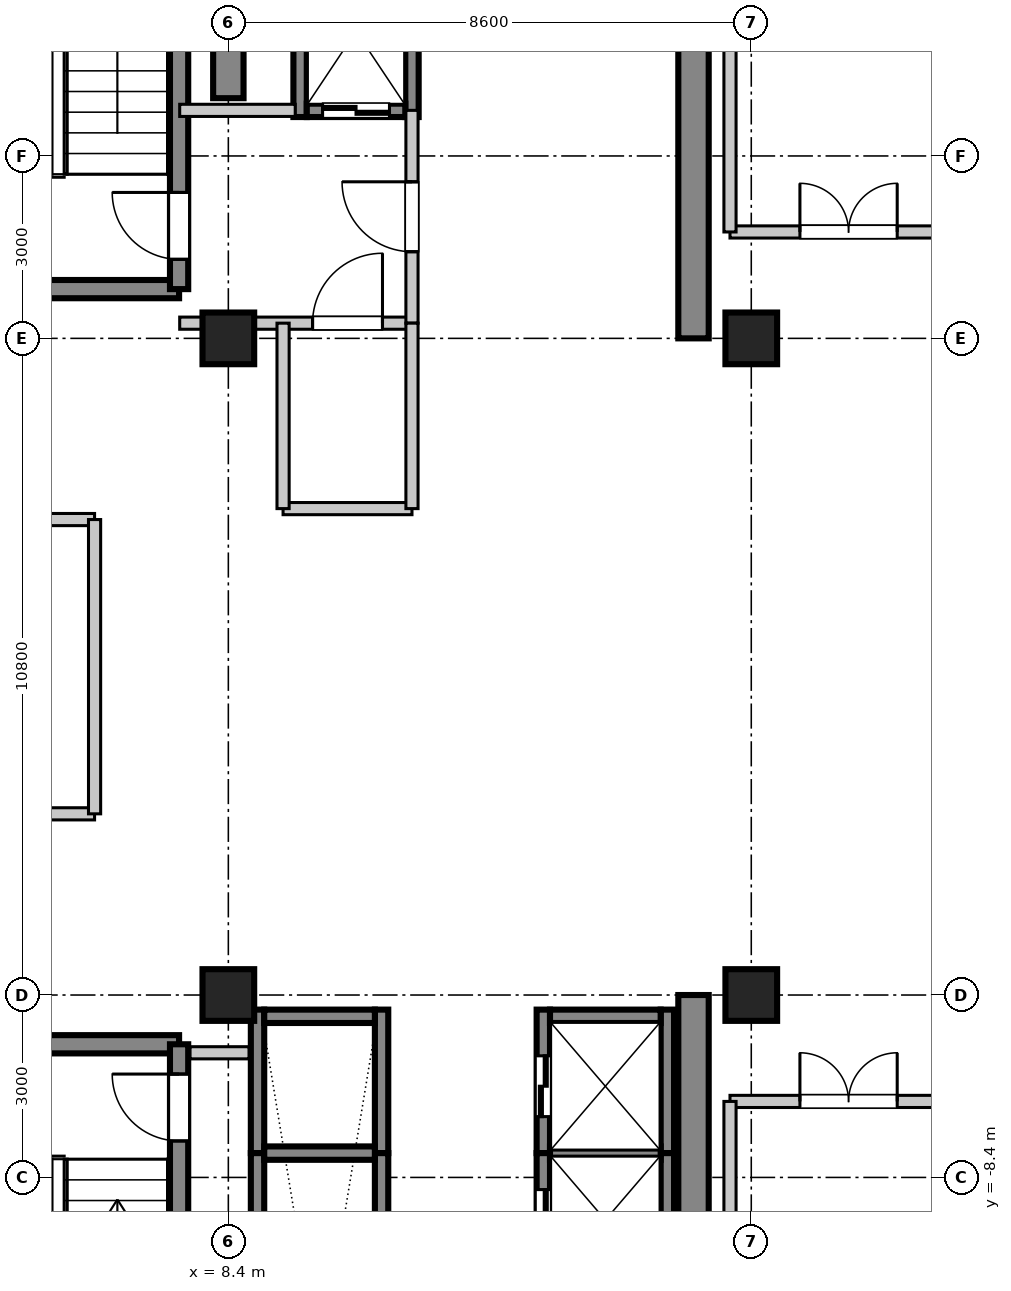
"""IFC4 building model, lengths in metres.
Left out: names, types, materials, properties, quantities, classifications, styles, units other than length and angle.
Written with IfcOpenShell. Run it as: python <this file> out.ifc"""

import sys

from ifc_helpers import new_model, si_unit, direction, frame, frame_2d, origin, origin_2d, place, context, subcontext, project, spatial, rectangle, extrude, source, transform, mapped, element, fill, save


model = new_model("IFC4")
c1 = context("Model", 3, precision=1e-05, world=origin(), true_north=direction((0.0, 1.0)))
c2 = subcontext(c1, "Body", "Model", "MODEL_VIEW")
j1 = project(units=[si_unit("LENGTHUNIT", "METRE"), si_unit("PLANEANGLEUNIT", "RADIAN")], contexts=[c1])
p1 = place(None, origin())
s1 = spatial("IfcSite", under=j1, at=p1, CompositionType="ELEMENT")
p2 = place(p1, origin())
s2 = spatial("IfcBuilding", under=s1, at=p2, CompositionType="ELEMENT")
p3 = place(p2, frame((0.0, 0.0, 200.1)))
s3 = spatial("IfcBuildingStorey", under=s2, at=p3, CompositionType="ELEMENT", Elevation=200.1)
m1 = source(origin(), c2, "Body", "SweptSolid", [
    extrude(rectangle(XDim=0.85, YDim=0.85, at=origin_2d()), origin(), (0.0, 0.0, 1.0), 4.755),
])
for number, where, z_axis, x_axis in (
    (1, (8.4, -5.4, 0.0), (0.0, 0.0, 1.0), (1.0, 0.0, 0.0)),
    (2, (8.4, 5.4, 0.0), (0.0, 0.0, 1.0), (1.0, 0.0, 0.0)),
    (3, (17.0, -5.4, 0.0), (0.0, 0.0, 1.0), (1.0, 0.0, 0.0)),
    (4, (17.0, 5.4, 0.0), (0.0, 0.0, 1.0), (1.0, 0.0, 0.0)),
):
    element("IfcColumn", number, at=place(p3, frame(where, z_axis=z_axis, x_axis=x_axis)), inside=s3, PredefinedType="PILASTER", context=c2, shape_type="MappedRepresentation", body=[
        mapped(m1, transform((0.0, 0.0, 0.0), scale=1.0)),
    ])
m2 = source(origin(), c2, "Body", "SweptSolid", [
    extrude(rectangle(XDim=7.65, YDim=0.5, at=frame_2d((3.825, 0.0))), origin(), (0.0, 0.0, 1.0), 4.51),
])
p4 = place(p3, frame((8.4, 9.35, 0.0), z_axis=(0.0, 0.0, 1.0), x_axis=(0.0, 1.0, 0.0)))
e5 = element("IfcWall", 5, at=p4, inside=s3, PredefinedType="SHEAR", context=c2, shape_type="MappedRepresentation", body=[
    mapped(m2, transform((0.0, 0.0, 0.0), scale=1.0)),
])
m3 = source(origin(), c2, "Body", "SweptSolid", [
    extrude(rectangle(XDim=11.6, YDim=0.5, at=frame_2d((5.8, 0.0))), origin(), (0.0, 0.0, 1.0), 4.51),
])
for number, where, z_axis, x_axis in (
    (6, (16.05, 5.4, 0.0), (0.0, 0.0, 1.0), (0.0, 1.0, 0.0)),
    (7, (16.05, -17.0, 0.0), (0.0, 0.0, 1.0), (0.0, 1.0, 0.0)),
):
    element("IfcWall", number, at=place(p3, frame(where, z_axis=z_axis, x_axis=x_axis)), inside=s3, PredefinedType="SHEAR", context=c2, shape_type="MappedRepresentation", body=[
        mapped(m3, transform((0.0, 0.0, 0.0), scale=1.0)),
    ])
m4 = source(origin(), c2, "Body", "SweptSolid", [
    extrude(rectangle(XDim=3.98, YDim=0.3, at=frame_2d((1.99, 0.0))), origin(), (0.0, 0.0, 1.0), 4.51),
])
p5 = place(p3, frame((3.61, 6.21, 0.0), z_axis=(0.0, 0.0, 1.0), x_axis=(1.0, 0.0, 0.0)))
e8 = element("IfcWall", 8, at=p5, inside=s3, PredefinedType="SHEAR", context=c2, shape_type="MappedRepresentation", body=[
    mapped(m4, transform((0.0, 0.0, 0.0), scale=1.0)),
])
m5 = source(origin(), c2, "Body", "SweptSolid", [
    extrude(rectangle(XDim=9.38, YDim=0.3, at=frame_2d((4.69, 0.0))), origin(), (0.0, 0.0, 1.0), 4.51),
])
p6 = place(p3, frame((7.59, 6.21, 0.0), z_axis=(0.0, 0.0, 1.0), x_axis=(0.0, 1.0, 0.0)))
e9 = element("IfcWall", 9, at=p6, inside=s3, PredefinedType="SHEAR", context=c2, shape_type="MappedRepresentation", body=[
    mapped(m5, transform((0.0, 0.0, 0.0), scale=1.0)),
])
p7 = place(p6, frame((0.49, 0.0, 0.0)))
e10 = element("IfcOpeningElement", 10, at=p7, cuts=e9, PredefinedType="OPENING", context=c2, shape_type="SweptSolid", body=[
    extrude(rectangle(XDim=1.1, YDim=2.15, at=frame_2d((0.55, 1.075))), frame((0.0, 0.16, 0.0), z_axis=(0.0, -1.0, 0.0), x_axis=(1.0, 0.0, 0.0)), (0.0, 0.0, 1.0), 0.32),
])
p8 = place(p3, frame((3.61, -6.21, 0.0), z_axis=(0.0, 0.0, 1.0), x_axis=(1.0, 0.0, 0.0)))
e11 = element("IfcWall", 11, at=p8, inside=s3, PredefinedType="SHEAR", context=c2, shape_type="MappedRepresentation", body=[
    mapped(m4, transform((0.0, 0.0, 0.0), scale=1.0)),
])
p9 = place(p3, frame((7.59, -15.59, 0.0), z_axis=(0.0, 0.0, 1.0), x_axis=(0.0, 1.0, 0.0)))
e12 = element("IfcWall", 12, at=p9, inside=s3, PredefinedType="SHEAR", context=c2, shape_type="MappedRepresentation", body=[
    mapped(m5, transform((0.0, 0.0, 0.0), scale=1.0)),
])
p10 = place(p9, frame((7.79, 0.0, 0.0)))
e13 = element("IfcOpeningElement", 13, at=p10, cuts=e12, PredefinedType="OPENING", context=c2, shape_type="SweptSolid", body=[
    extrude(rectangle(XDim=1.1, YDim=2.15, at=frame_2d((0.55, 1.075))), frame((0.0, 0.16, 0.0), z_axis=(0.0, -1.0, 0.0), x_axis=(1.0, 0.0, 0.0)), (0.0, 0.0, 1.0), 0.32),
])
m6 = source(origin(), c2, "Body", "SweptSolid", [
    extrude(rectangle(XDim=2.36, YDim=0.22, at=frame_2d((1.18, 0.0))), origin(), (0.0, 0.0, 1.0), 4.51),
])
p11 = place(p3, frame((13.58, -8.0, 0.0), z_axis=(0.0, 0.0, 1.0), x_axis=(0.0, 1.0, 0.0)))
e14 = element("IfcWall", 14, at=p11, inside=s3, PredefinedType="SHEAR", context=c2, shape_type="MappedRepresentation", body=[
    mapped(m6, transform((0.0, 0.0, 0.0), scale=1.0)),
])
p12 = place(p11, frame((0.6, 0.0, 0.0)))
e15 = element("IfcOpeningElement", 15, at=p12, cuts=e14, PredefinedType="OPENING", context=c2, shape_type="SweptSolid", body=[
    extrude(rectangle(XDim=1.0, YDim=2.2, at=frame_2d((0.5, 1.1))), frame((0.0, 0.12, 0.0), z_axis=(0.0, -1.0, 0.0), x_axis=(1.0, 0.0, 0.0)), (0.0, 0.0, 1.0), 0.24),
])
p13 = place(p3, frame((15.62, -8.0, 0.0), z_axis=(0.0, 0.0, 1.0), x_axis=(0.0, 1.0, 0.0)))
e16 = element("IfcWall", 16, at=p13, inside=s3, PredefinedType="SHEAR", context=c2, shape_type="MappedRepresentation", body=[
    mapped(m6, transform((0.0, 0.0, 0.0), scale=1.0)),
])
m7 = source(origin(), c2, "Body", "SweptSolid", [
    extrude(rectangle(XDim=1.82, YDim=0.22, at=frame_2d((0.91, 0.0))), origin(), (0.0, 0.0, 1.0), 4.51),
])
p14 = place(p3, frame((13.69, -5.75, 0.0), z_axis=(0.0, 0.0, 1.0), x_axis=(1.0, 0.0, 0.0)))
e17 = element("IfcWall", 17, at=p14, inside=s3, PredefinedType="SHEAR", context=c2, shape_type="MappedRepresentation", body=[
    mapped(m7, transform((0.0, 0.0, 0.0), scale=1.0)),
])
m8 = source(origin(), c2, "Body", "SweptSolid", [
    extrude(rectangle(XDim=2.2, YDim=0.22, at=frame_2d((1.1, 0.0))), origin(), (0.0, 0.0, 1.0), 4.51),
])
p15 = place(p3, frame((13.58, -10.2, 0.0), z_axis=(0.0, 0.0, 1.0), x_axis=(0.0, 1.0, 0.0)))
e18 = element("IfcWall", 18, at=p15, inside=s3, PredefinedType="SHEAR", context=c2, shape_type="MappedRepresentation", body=[
    mapped(m8, transform((0.0, 0.0, 0.0), scale=1.0)),
])
p16 = place(p15, frame((0.6, 0.0, 0.0)))
e19 = element("IfcOpeningElement", 19, at=p16, cuts=e18, PredefinedType="OPENING", context=c2, shape_type="SweptSolid", body=[
    extrude(rectangle(XDim=1.0, YDim=2.2, at=frame_2d((0.5, 1.1))), frame((0.0, 0.12, 0.0), z_axis=(0.0, -1.0, 0.0), x_axis=(1.0, 0.0, 0.0)), (0.0, 0.0, 1.0), 0.24),
])
p17 = place(p3, frame((15.62, -10.2, 0.0), z_axis=(0.0, 0.0, 1.0), x_axis=(0.0, 1.0, 0.0)))
e20 = element("IfcWall", 20, at=p17, inside=s3, PredefinedType="SHEAR", context=c2, shape_type="MappedRepresentation", body=[
    mapped(m8, transform((0.0, 0.0, 0.0), scale=1.0)),
])
m9 = source(origin(), c2, "Body", "SweptSolid", [
    extrude(rectangle(XDim=1.82, YDim=0.22, at=frame_2d((0.91, 0.0))), origin(), (0.0, 0.0, 1.0), 4.8),
])
p18 = place(p3, frame((13.69, -8.0, 0.0), z_axis=(0.0, 0.0, 1.0), x_axis=(1.0, 0.0, 0.0)))
e21 = element("IfcWall", 21, at=p18, inside=s3, PredefinedType="SHEAR", context=c2, shape_type="MappedRepresentation", body=[
    mapped(m9, transform((0.0, 0.0, 0.0), scale=1.0)),
])
for number, where, z_axis, x_axis in (
    (22, (8.88, -8.0, 0.0), (0.0, 0.0, 1.0), (0.0, 1.0, 0.0)),
    (23, (10.92, -8.0, 0.0), (0.0, 0.0, 1.0), (0.0, 1.0, 0.0)),
):
    element("IfcWall", number, at=place(p3, frame(where, z_axis=z_axis, x_axis=x_axis)), inside=s3, PredefinedType="SHEAR", context=c2, shape_type="MappedRepresentation", body=[
        mapped(m6, transform((0.0, 0.0, 0.0), scale=1.0)),
    ])
p19 = place(p3, frame((8.99, -5.75, 0.0), z_axis=(0.0, 0.0, 1.0), x_axis=(1.0, 0.0, 0.0)))
e24 = element("IfcWall", 24, at=p19, inside=s3, PredefinedType="SHEAR", context=c2, shape_type="MappedRepresentation", body=[
    mapped(m7, transform((0.0, 0.0, 0.0), scale=1.0)),
])
for number, where, z_axis, x_axis in (
    (25, (8.88, -10.2, 0.0), (0.0, 0.0, 1.0), (0.0, 1.0, 0.0)),
    (26, (10.92, -10.2, 0.0), (0.0, 0.0, 1.0), (0.0, 1.0, 0.0)),
):
    element("IfcWall", number, at=place(p3, frame(where, z_axis=z_axis, x_axis=x_axis)), inside=s3, PredefinedType="SHEAR", context=c2, shape_type="MappedRepresentation", body=[
        mapped(m8, transform((0.0, 0.0, 0.0), scale=1.0)),
    ])
p20 = place(p3, frame((8.99, -8.0, 0.0), z_axis=(0.0, 0.0, 1.0), x_axis=(1.0, 0.0, 0.0)))
e27 = element("IfcWall", 27, at=p20, inside=s3, PredefinedType="SHEAR", context=c2, shape_type="MappedRepresentation", body=[
    mapped(m9, transform((0.0, 0.0, 0.0), scale=1.0)),
])
m10 = source(origin(), c2, "Body", "SweptSolid", [
    extrude(rectangle(XDim=2.82, YDim=0.22, at=frame_2d((1.41, 0.0))), origin(), (0.0, 0.0, 1.0), 4.51),
])
for number, where, z_axis, x_axis in (
    (28, (9.58, 9.04, 0.0), (0.0, 0.0, 1.0), (0.0, 1.0, 0.0)),
    (29, (11.42, 9.04, 0.0), (0.0, 0.0, 1.0), (0.0, 1.0, 0.0)),
):
    element("IfcWall", number, at=place(p3, frame(where, z_axis=z_axis, x_axis=x_axis)), inside=s3, PredefinedType="SHEAR", context=c2, shape_type="MappedRepresentation", body=[
        mapped(m10, transform((0.0, 0.0, 0.0), scale=1.0)),
    ])
m11 = source(origin(), c2, "Body", "SweptSolid", [
    extrude(rectangle(XDim=1.62, YDim=0.22, at=frame_2d((0.81, 0.0))), origin(), (0.0, 0.0, 1.0), 4.51),
])
p21 = place(p3, frame((9.69, 9.15, 0.0), z_axis=(0.0, 0.0, 1.0), x_axis=(1.0, 0.0, 0.0)))
e30 = element("IfcWall", 30, at=p21, inside=s3, PredefinedType="SHEAR", context=c2, shape_type="MappedRepresentation", body=[
    mapped(m11, transform((0.0, 0.0, 0.0), scale=1.0)),
])
p22 = place(p21, frame((0.26, 0.0, 0.0)))
e31 = element("IfcOpeningElement", 31, at=p22, cuts=e30, PredefinedType="OPENING", context=c2, shape_type="SweptSolid", body=[
    extrude(rectangle(XDim=1.1, YDim=2.2, at=frame_2d((0.55, 1.1))), frame((0.0, 0.12, 0.0), z_axis=(0.0, -1.0, 0.0), x_axis=(1.0, 0.0, 0.0)), (0.0, 0.0, 1.0), 0.24),
])
m12 = source(origin(), c2, "Body", "SweptSolid", [
    extrude(rectangle(XDim=3.82, YDim=0.2, at=frame_2d((1.91, 0.0))), origin(), (0.0, 0.0, 1.0), 3.4),
])
p23 = place(p3, frame((7.6, 5.65, 0.0), z_axis=(0.0, 0.0, 1.0), x_axis=(1.0, 0.0, 0.0)))
e32 = element("IfcWall", 32, at=p23, inside=s3, PredefinedType="PARTITIONING", context=c2, shape_type="MappedRepresentation", body=[
    mapped(m12, transform((0.0, 0.0, 0.0), scale=1.0)),
])
p24 = place(p23, frame((2.185, 0.0, 0.0)))
e33 = element("IfcOpeningElement", 33, at=p24, cuts=e32, PredefinedType="OPENING", context=c2, shape_type="SweptSolid", body=[
    extrude(rectangle(XDim=1.15, YDim=2.15, at=frame_2d((0.575, 1.075))), frame((0.0, 0.11, 0.0), z_axis=(0.0, -1.0, 0.0), x_axis=(1.0, 0.0, 0.0)), (0.0, 0.0, 1.0), 0.22),
])
m13 = source(origin(), c2, "Body", "SweptSolid", [
    extrude(rectangle(XDim=1.9, YDim=0.2, at=frame_2d((0.95, 0.0))), origin(), (0.0, 0.0, 1.0), 3.4),
])
p25 = place(p3, frame((7.6, 9.15, 0.0), z_axis=(0.0, 0.0, 1.0), x_axis=(1.0, 0.0, 0.0)))
e34 = element("IfcWall", 34, at=p25, inside=s3, PredefinedType="PARTITIONING", context=c2, shape_type="MappedRepresentation", body=[
    mapped(m13, transform((0.0, 0.0, 0.0), scale=1.0)),
])
m14 = source(origin(), c2, "Body", "SweptSolid", [
    extrude(rectangle(XDim=3.5, YDim=0.2, at=frame_2d((1.75, 0.0))), origin(), (0.0, 0.0, 1.0), 3.4),
])
p26 = place(p3, frame((11.42, 5.65, 0.0), z_axis=(0.0, 0.0, 1.0), x_axis=(0.0, 1.0, 0.0)))
e35 = element("IfcWall", 35, at=p26, inside=s3, PredefinedType="PARTITIONING", context=c2, shape_type="MappedRepresentation", body=[
    mapped(m14, transform((0.0, 0.0, 0.0), scale=1.0)),
])
p27 = place(p26, frame((1.175, 0.0, 0.0)))
e36 = element("IfcOpeningElement", 36, at=p27, cuts=e35, PredefinedType="OPENING", context=c2, shape_type="SweptSolid", body=[
    extrude(rectangle(XDim=1.15, YDim=2.15, at=frame_2d((0.575, 1.075))), frame((0.0, 0.11, 0.0), z_axis=(0.0, -1.0, 0.0), x_axis=(1.0, 0.0, 0.0)), (0.0, 0.0, 1.0), 0.22),
])
m15 = source(origin(), c2, "Body", "SweptSolid", [
    extrude(rectangle(XDim=0.97, YDim=0.2, at=frame_2d((0.485, 0.0))), origin(), (0.0, 0.0, 1.0), 3.4),
])
p28 = place(p3, frame((7.77, -6.35, 0.0), z_axis=(0.0, 0.0, 1.0), x_axis=(1.0, 0.0, 0.0)))
e37 = element("IfcWall", 37, at=p28, inside=s3, PredefinedType="PARTITIONING", context=c2, shape_type="MappedRepresentation", body=[
    mapped(m15, transform((0.0, 0.0, 0.0), scale=1.0)),
])
m16 = source(origin(), c2, "Body", "SweptSolid", [
    extrude(rectangle(XDim=2.12, YDim=0.2, at=frame_2d((1.06, 0.0))), origin(), (0.0, 0.0, 1.0), 3.4),
])
p29 = place(p3, frame((9.3, 2.6, 0.0), z_axis=(0.0, 0.0, 1.0), x_axis=(1.0, 0.0, 0.0)))
e38 = element("IfcWall", 38, at=p29, inside=s3, PredefinedType="PARTITIONING", context=c2, shape_type="MappedRepresentation", body=[
    mapped(m16, transform((0.0, 0.0, 0.0), scale=1.0)),
])
m17 = source(origin(), c2, "Body", "SweptSolid", [
    extrude(rectangle(XDim=3.05, YDim=0.2, at=frame_2d((1.525, 0.0))), origin(), (0.0, 0.0, 1.0), 3.4),
])
for number, where, z_axis, x_axis in (
    (39, (9.3, 2.6, 0.0), (0.0, 0.0, 1.0), (0.0, 1.0, 0.0)),
    (40, (11.42, 2.6, 0.0), (0.0, 0.0, 1.0), (0.0, 1.0, 0.0)),
):
    element("IfcWall", number, at=place(p3, frame(where, z_axis=z_axis, x_axis=x_axis)), inside=s3, PredefinedType="PARTITIONING", context=c2, shape_type="MappedRepresentation", body=[
        mapped(m17, transform((0.0, 0.0, 0.0), scale=1.0)),
    ])
m18 = source(origin(), c2, "Body", "SweptSolid", [
    extrude(rectangle(XDim=15.3, YDim=0.2, at=frame_2d((7.65, 0.0))), origin(), (0.0, 0.0, 1.0), 3.4),
])
p30 = place(p3, frame((-9.1, -2.42, 0.0), z_axis=(0.0, 0.0, 1.0), x_axis=(1.0, 0.0, 0.0)))
e41 = element("IfcWall", 41, at=p30, inside=s3, PredefinedType="PARTITIONING", context=c2, shape_type="MappedRepresentation", body=[
    mapped(m18, transform((0.0, 0.0, 0.0), scale=1.0)),
])
p31 = place(p30, frame((8.525, 0.0, 0.0)))
e42 = element("IfcOpeningElement", 42, at=p31, cuts=e41, PredefinedType="OPENING", context=c2, shape_type="SweptSolid", body=[
    extrude(rectangle(XDim=1.15, YDim=2.15, at=frame_2d((0.575, 1.075))), frame((0.0, 0.11, 0.0), z_axis=(0.0, -1.0, 0.0), x_axis=(1.0, 0.0, 0.0)), (0.0, 0.0, 1.0), 0.22),
])
p32 = place(p3, frame((-9.1, 2.42, 0.0), z_axis=(0.0, 0.0, 1.0), x_axis=(1.0, 0.0, 0.0)))
e43 = element("IfcWall", 43, at=p32, inside=s3, PredefinedType="PARTITIONING", context=c2, shape_type="MappedRepresentation", body=[
    mapped(m18, transform((0.0, 0.0, 0.0), scale=1.0)),
])
m19 = source(origin(), c2, "Body", "SweptSolid", [
    extrude(rectangle(XDim=4.84, YDim=0.2, at=frame_2d((2.42, 0.0))), origin(), (0.0, 0.0, 1.0), 3.4),
])
p33 = place(p3, frame((6.2, -2.42, 0.0), z_axis=(0.0, 0.0, 1.0), x_axis=(0.0, 1.0, 0.0)))
e44 = element("IfcWall", 44, at=p33, inside=s3, PredefinedType="PARTITIONING", context=c2, shape_type="MappedRepresentation", body=[
    mapped(m19, transform((0.0, 0.0, 0.0), scale=1.0)),
])
m20 = source(origin(), c2, "Body", "SweptSolid", [
    extrude(rectangle(XDim=5.57, YDim=0.2, at=frame_2d((2.785, 0.0))), origin(), (0.0, 0.0, 1.0), 3.4),
])
p34 = place(p3, frame((16.65, 7.15, 0.0), z_axis=(0.0, 0.0, 1.0), x_axis=(1.0, 0.0, 0.0)))
e45 = element("IfcWall", 45, at=p34, inside=s3, PredefinedType="PARTITIONING", context=c2, shape_type="MappedRepresentation", body=[
    mapped(m20, transform((0.0, 0.0, 0.0), scale=1.0)),
])
p35 = place(p34, frame((1.15, 0.0, 0.0)))
e46 = element("IfcOpeningElement", 46, at=p35, cuts=e45, PredefinedType="OPENING", context=c2, shape_type="SweptSolid", body=[
    extrude(rectangle(XDim=1.6, YDim=2.15, at=frame_2d((0.8, 1.075))), frame((0.0, 0.11, 0.0), z_axis=(0.0, -1.0, 0.0), x_axis=(1.0, 0.0, 0.0)), (0.0, 0.0, 1.0), 0.22),
])
m21 = source(origin(), c2, "Body", "SweptSolid", [
    extrude(rectangle(XDim=8.9, YDim=0.2, at=frame_2d((4.45, 0.0))), origin(), (0.0, 0.0, 1.0), 3.4),
])
p36 = place(p3, frame((16.65, 7.15, 0.0), z_axis=(0.0, 0.0, 1.0), x_axis=(0.0, 1.0, 0.0)))
e47 = element("IfcWall", 47, at=p36, inside=s3, PredefinedType="PARTITIONING", context=c2, shape_type="MappedRepresentation", body=[
    mapped(m21, transform((0.0, 0.0, 0.0), scale=1.0)),
])
p37 = place(p3, frame((16.65, -7.15, 0.0), z_axis=(0.0, 0.0, 1.0), x_axis=(1.0, 0.0, 0.0)))
e48 = element("IfcWall", 48, at=p37, inside=s3, PredefinedType="PARTITIONING", context=c2, shape_type="MappedRepresentation", body=[
    mapped(m20, transform((0.0, 0.0, 0.0), scale=1.0)),
])
p38 = place(p37, frame((1.15, 0.0, 0.0)))
e49 = element("IfcOpeningElement", 49, at=p38, cuts=e48, PredefinedType="OPENING", context=c2, shape_type="SweptSolid", body=[
    extrude(rectangle(XDim=1.6, YDim=2.15, at=frame_2d((0.8, 1.075))), frame((0.0, 0.11, 0.0), z_axis=(0.0, -1.0, 0.0), x_axis=(1.0, 0.0, 0.0)), (0.0, 0.0, 1.0), 0.22),
])
p39 = place(p3, frame((16.65, -16.05, 0.0), z_axis=(0.0, 0.0, 1.0), x_axis=(0.0, 1.0, 0.0)))
e50 = element("IfcWall", 50, at=p39, inside=s3, PredefinedType="PARTITIONING", context=c2, shape_type="MappedRepresentation", body=[
    mapped(m21, transform((0.0, 0.0, 0.0), scale=1.0)),
])
m22 = source(origin(), c2, "Body", "SweptSolid", [
    extrude(rectangle(XDim=1.1, YDim=2.15, at=frame_2d((0.55, 1.075))), frame((0.0, 0.025, 0.0), z_axis=(0.0, -1.0, 0.0), x_axis=(1.0, 0.0, 0.0)), (0.0, 0.0, 1.0), 0.05),
])
p40 = place(p7, origin())
e51 = element("IfcDoor", 51, at=p40, inside=s3, OperationType="SINGLE_SWING_RIGHT", PredefinedType="DOOR", context=c2, shape_type="MappedRepresentation", body=[
    mapped(m22, transform((0.0, 0.0, 0.0), scale=1.0)),
])
fill(e10, e51)
p41 = place(p10, origin())
e52 = element("IfcDoor", 52, at=p41, inside=s3, OperationType="SINGLE_SWING_RIGHT", PredefinedType="DOOR", context=c2, shape_type="MappedRepresentation", body=[
    mapped(m22, transform((0.0, 0.0, 0.0), scale=1.0)),
])
fill(e13, e52)
m23 = source(origin(), c2, "Body", "SweptSolid", [
    extrude(rectangle(XDim=1.0, YDim=2.2, at=frame_2d((0.5, 1.1))), frame((0.0, 0.025, 0.0), z_axis=(0.0, -1.0, 0.0), x_axis=(1.0, 0.0, 0.0)), (0.0, 0.0, 1.0), 0.05),
])
p42 = place(p12, origin())
e53 = element("IfcDoor", 53, at=p42, inside=s3, OperationType="DOUBLE_DOOR_SLIDING", PredefinedType="DOOR", context=c2, shape_type="MappedRepresentation", body=[
    mapped(m23, transform((0.0, 0.0, 0.0), scale=1.0)),
])
fill(e15, e53)
p43 = place(p16, origin())
e54 = element("IfcDoor", 54, at=p43, inside=s3, OperationType="DOUBLE_DOOR_SLIDING", PredefinedType="DOOR", context=c2, shape_type="MappedRepresentation", body=[
    mapped(m23, transform((0.0, 0.0, 0.0), scale=1.0)),
])
fill(e19, e54)
m24 = source(origin(), c2, "Body", "SweptSolid", [
    extrude(rectangle(XDim=1.1, YDim=2.2, at=frame_2d((0.55, 1.1))), frame((0.0, 0.025, 0.0), z_axis=(0.0, -1.0, 0.0), x_axis=(1.0, 0.0, 0.0)), (0.0, 0.0, 1.0), 0.05),
])
p44 = place(p22, frame((1.1, 0.0, 0.0), z_axis=(0.0, 0.0, 1.0), x_axis=(-1.0, 0.0, 0.0)))
e55 = element("IfcDoor", 55, at=p44, inside=s3, OperationType="DOUBLE_DOOR_SLIDING", PredefinedType="DOOR", context=c2, shape_type="MappedRepresentation", body=[
    mapped(m24, transform((0.0, 0.0, 0.0), scale=1.0)),
])
fill(e31, e55)
m25 = source(origin(), c2, "Body", "SweptSolid", [
    extrude(rectangle(XDim=1.15, YDim=2.15, at=frame_2d((0.575, 1.075))), frame((0.0, 0.025, 0.0), z_axis=(0.0, -1.0, 0.0), x_axis=(1.0, 0.0, 0.0)), (0.0, 0.0, 1.0), 0.05),
])
p45 = place(p27, frame((1.15, 0.0, 0.0), z_axis=(0.0, 0.0, 1.0), x_axis=(-1.0, 0.0, 0.0)))
e56 = element("IfcDoor", 56, at=p45, inside=s3, OperationType="SINGLE_SWING_RIGHT", PredefinedType="DOOR", context=c2, shape_type="MappedRepresentation", body=[
    mapped(m25, transform((0.0, 0.0, 0.0), scale=1.0)),
])
fill(e36, e56)
p46 = place(p24, frame((1.15, 0.0, 0.0), z_axis=(0.0, 0.0, 1.0), x_axis=(-1.0, 0.0, 0.0)))
e57 = element("IfcDoor", 57, at=p46, inside=s3, OperationType="SINGLE_SWING_RIGHT", PredefinedType="DOOR", context=c2, shape_type="MappedRepresentation", body=[
    mapped(m25, transform((0.0, 0.0, 0.0), scale=1.0)),
])
fill(e33, e57)
m26 = source(origin(), c2, "Body", "SweptSolid", [
    extrude(rectangle(XDim=1.6, YDim=2.15, at=frame_2d((0.8, 1.075))), frame((0.0, 0.025, 0.0), z_axis=(0.0, -1.0, 0.0), x_axis=(1.0, 0.0, 0.0)), (0.0, 0.0, 1.0), 0.05),
])
p47 = place(p35, origin())
e58 = element("IfcDoor", 58, at=p47, inside=s3, OperationType="DOUBLE_DOOR_SINGLE_SWING", PredefinedType="DOOR", context=c2, shape_type="MappedRepresentation", body=[
    mapped(m26, transform((0.0, 0.0, 0.0), scale=1.0)),
])
fill(e46, e58)
p48 = place(p38, frame((1.6, 0.0, 0.0), z_axis=(0.0, 0.0, 1.0), x_axis=(-1.0, 0.0, 0.0)))
e59 = element("IfcDoor", 59, at=p48, inside=s3, OperationType="DOUBLE_DOOR_SINGLE_SWING", PredefinedType="DOOR", context=c2, shape_type="MappedRepresentation", body=[
    mapped(m26, transform((0.0, 0.0, 0.0), scale=1.0)),
])
fill(e49, e59)
save(model, sys.argv[1])
